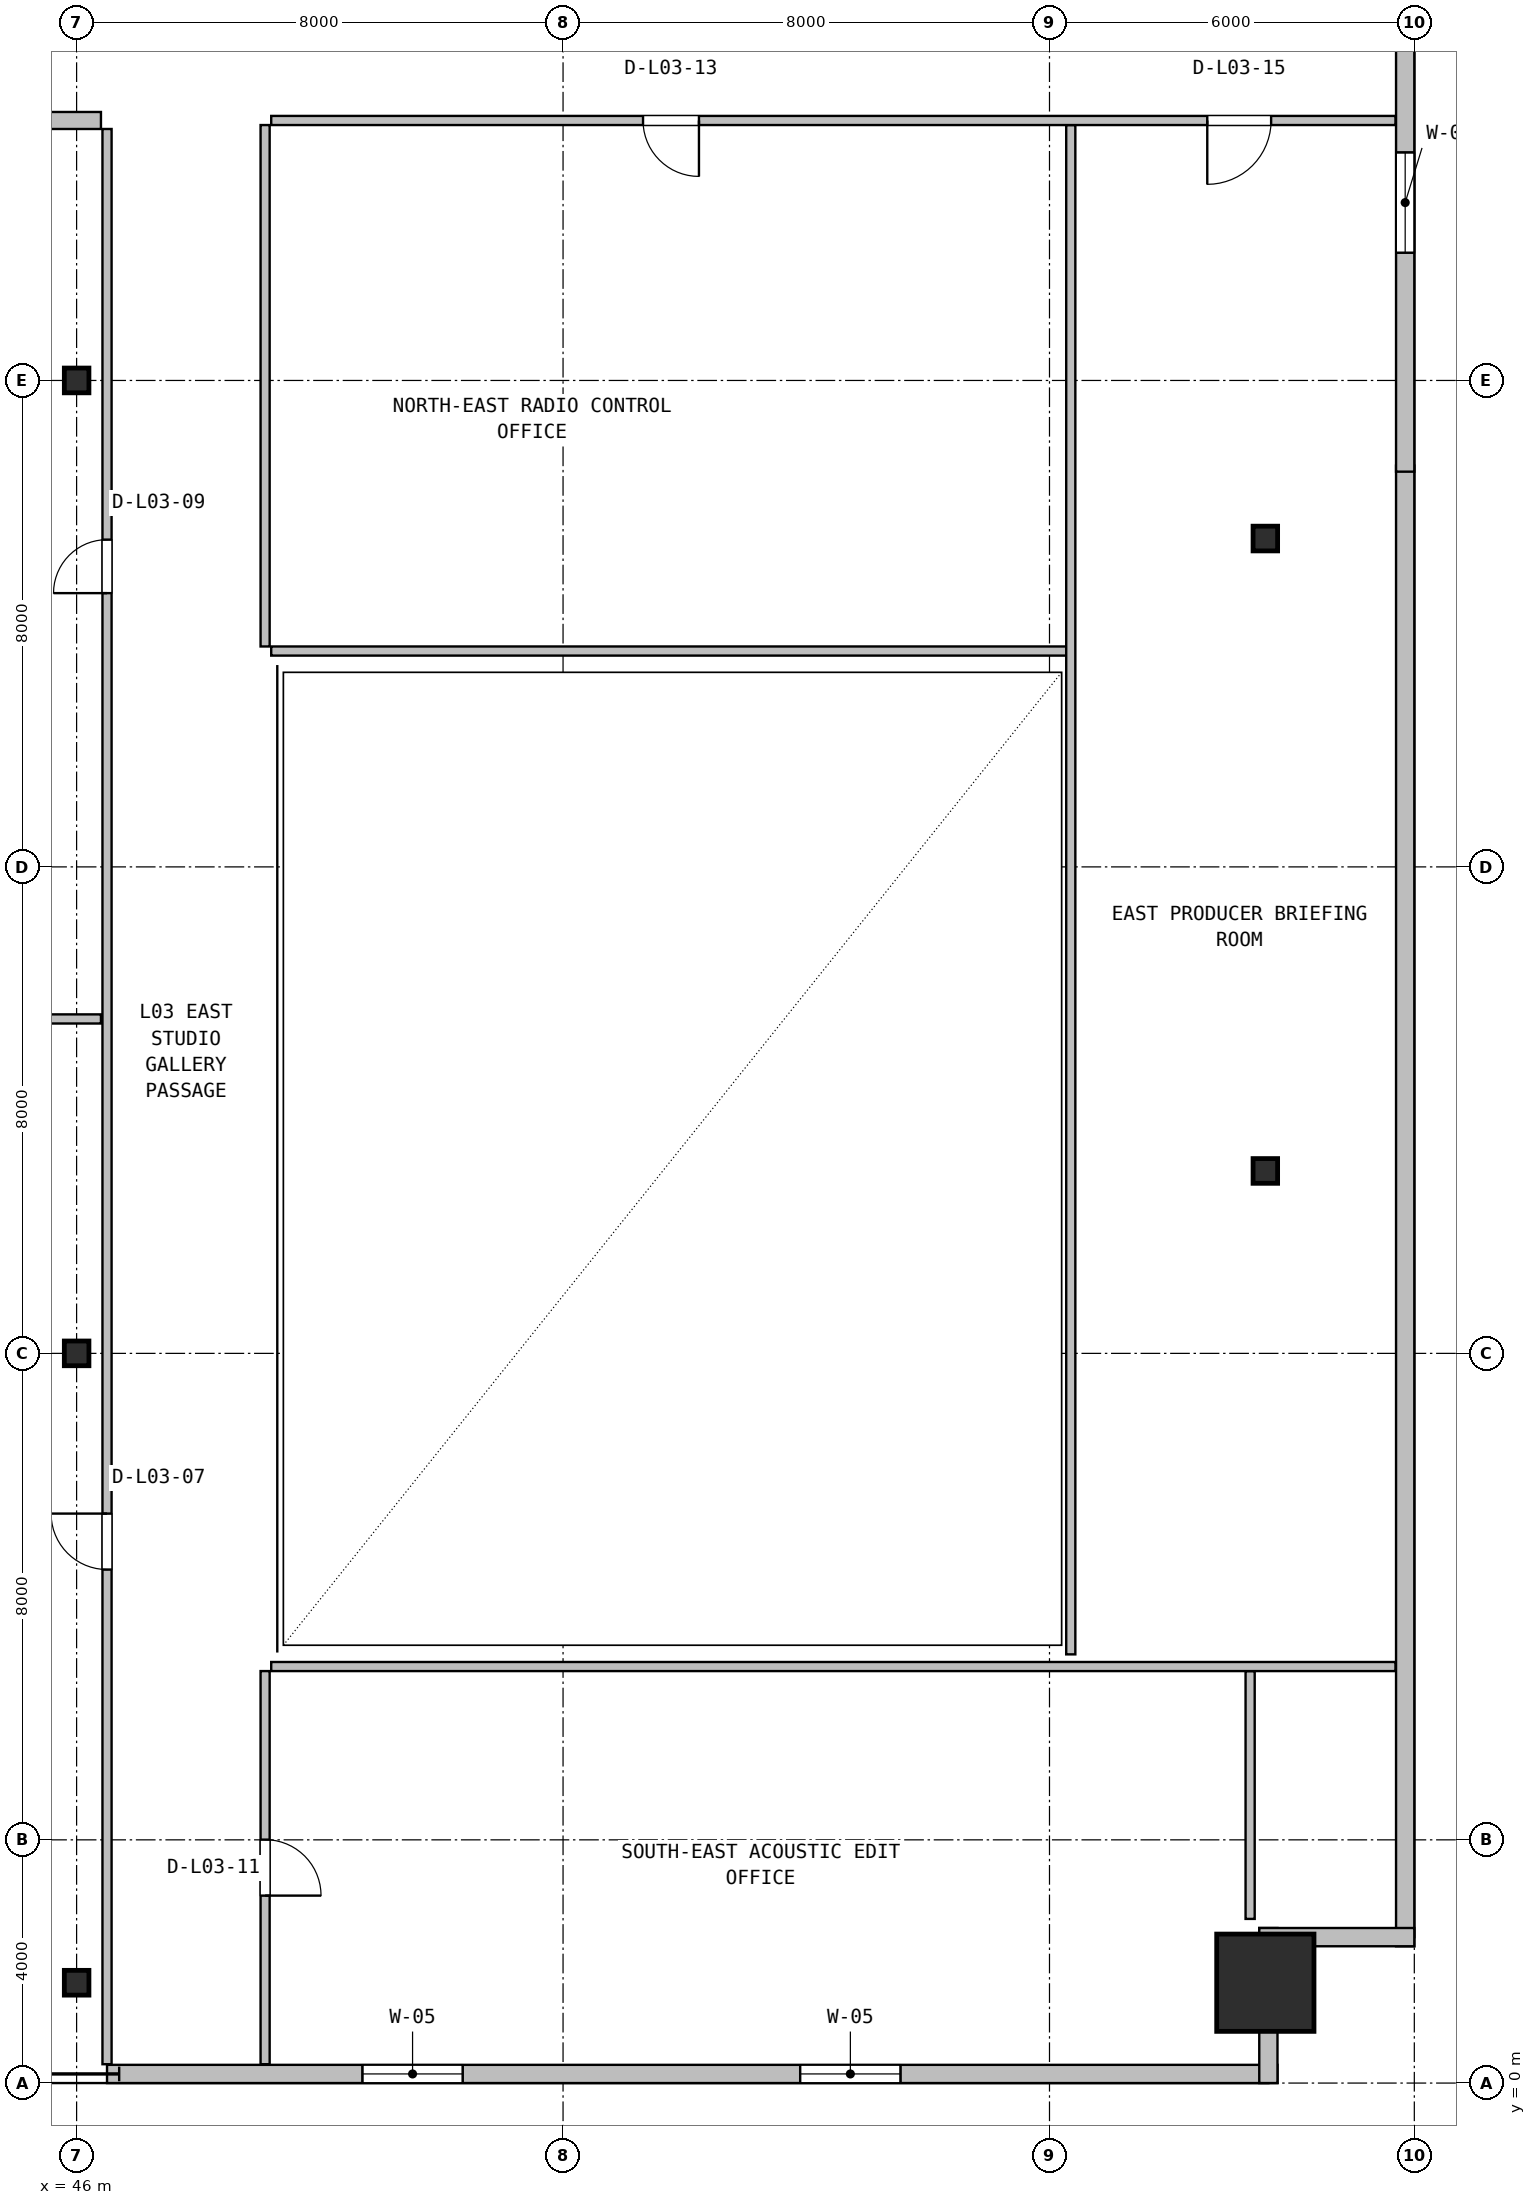
"""IFC4 building model, lengths in metres.
Left out: names, types, materials, properties, quantities, classifications, styles, units other than length and angle.
Written with IfcOpenShell. Run it as: python <this file> out.ifc"""

import sys

from ifc_helpers import new_model, si_unit, direction, frame, frame_2d, origin, origin_2d, place, context, subcontext, project, spatial, rectangle, hollow_rectangle, i_section, extrude, source, transform, mapped, element, fill, save


model = new_model("IFC4")
c1 = context("Model", 3, precision=1e-05, world=origin(), true_north=direction((0.0, 1.0)))
c2 = subcontext(c1, "Body", "Model", "MODEL_VIEW")
j1 = project(units=[si_unit("LENGTHUNIT", "METRE"), si_unit("PLANEANGLEUNIT", "RADIAN")], contexts=[c1])
p1 = place(None, origin())
s1 = spatial("IfcSite", under=j1, at=p1, CompositionType="ELEMENT")
p2 = place(p1, origin())
s2 = spatial("IfcBuilding", under=s1, at=p2, CompositionType="ELEMENT")
p3 = place(p2, frame((0.0, 0.0, 16.8)))
s3 = spatial("IfcBuildingStorey", under=s2, at=p3, CompositionType="ELEMENT", Elevation=16.8)
m1 = source(origin(), c2, "Body", "SweptSolid", [
    extrude(hollow_rectangle(XDim=1.6, YDim=1.6, WallThickness=0.06, at=origin_2d()), origin(), (0.0, 0.0, 1.0), 5.4),
])
p4 = place(p3, frame((65.55, 1.65, 0.0), z_axis=(0.0, 0.0, 1.0), x_axis=(1.0, 0.0, 0.0)))
e1 = element("IfcColumn", 1, at=p4, inside=s3, PredefinedType="COLUMN", context=c2, shape_type="MappedRepresentation", body=[
    mapped(m1, transform((0.0, 0.0, 0.0), x_axis=(1.0, 0.0, 0.0), y_axis=(0.0, 1.0, 0.0), z_axis=(0.0, 0.0, 1.0), scale=1.0)),
])
m2 = source(origin(), c2, "Body", "SweptSolid", [
    extrude(i_section(OverallWidth=0.404, OverallDepth=0.407, WebThickness=0.027, FlangeThickness=0.044, FilletRadius=0.018, at=origin_2d()), origin(), (0.0, 0.0, 1.0), 5.4),
])
for number, where, z_axis, x_axis in (
    (2, (46.0, 1.65, 0.0), (0.0, 0.0, 1.0), (1.0, 0.0, 0.0)),
    (3, (46.0, 12.0, 0.0), (0.0, 0.0, 1.0), (1.0, 0.0, 0.0)),
    (4, (46.0, 28.0, 0.0), (0.0, 0.0, 1.0), (1.0, 0.0, 0.0)),
    (5, (65.55, 15.0, 0.0), (0.0, 0.0, 1.0), (1.0, 0.0, 0.0)),
    (6, (65.55, 25.4, 0.0), (0.0, 0.0, 1.0), (1.0, 0.0, 0.0)),
):
    element("IfcColumn", number, at=place(p3, frame(where, z_axis=z_axis, x_axis=x_axis)), inside=s3, PredefinedType="COLUMN", context=c2, shape_type="MappedRepresentation", body=[
        mapped(m2, transform((0.0, 0.0, 0.0), x_axis=(1.0, 0.0, 0.0), y_axis=(0.0, 1.0, 0.0), z_axis=(0.0, 0.0, 1.0), scale=1.0)),
    ])
p5 = place(p3, frame((46.5, 0.15, 0.0), z_axis=(0.0, 0.0, 1.0), x_axis=(1.0, 0.0, 0.0)))
e7 = element("IfcWall", 7, at=p5, inside=s3, PredefinedType="SOLIDWALL", context=c2, shape_type="SweptSolid", body=[
    extrude(rectangle(XDim=19.25, YDim=0.3, at=frame_2d((9.625, 0.0))), origin(), (0.0, 0.0, 1.0), 5.06),
])
p6 = place(p5, frame((4.2, 0.0, 0.9)))
e8 = element("IfcOpeningElement", 8, at=p6, cuts=e7, PredefinedType="OPENING", context=c2, shape_type="SweptSolid", body=[
    extrude(rectangle(XDim=1.65, YDim=1.8, at=frame_2d((0.825, 0.9))), frame((0.0, 0.16, 0.0), z_axis=(0.0, -1.0, 0.0), x_axis=(1.0, 0.0, 0.0)), (0.0, 0.0, 1.0), 0.32),
])
p7 = place(p5, frame((11.4, 0.0, 0.9)))
e9 = element("IfcOpeningElement", 9, at=p7, cuts=e7, PredefinedType="OPENING", context=c2, shape_type="SweptSolid", body=[
    extrude(rectangle(XDim=1.65, YDim=1.8, at=frame_2d((0.825, 0.9))), frame((0.0, 0.16, 0.0), z_axis=(0.0, -1.0, 0.0), x_axis=(1.0, 0.0, 0.0)), (0.0, 0.0, 1.0), 0.32),
])
p8 = place(p3, frame((67.85, 2.25, 0.0), z_axis=(0.0, 0.0, 1.0), x_axis=(0.0, 1.0, 0.0)))
e10 = element("IfcWall", 10, at=p8, inside=s3, PredefinedType="SOLIDWALL", context=c2, shape_type="SweptSolid", body=[
    extrude(rectangle(XDim=24.35, YDim=0.3, at=frame_2d((12.175, 0.0))), origin(), (0.0, 0.0, 1.0), 5.06),
])
p9 = place(p3, frame((67.85, 26.5, 0.0), z_axis=(0.0, 0.0, 1.0), x_axis=(0.0, 1.0, 0.0)))
e11 = element("IfcWall", 11, at=p9, inside=s3, PredefinedType="SOLIDWALL", context=c2, shape_type="SweptSolid", body=[
    extrude(rectangle(XDim=19.25, YDim=0.3, at=frame_2d((9.625, 0.0))), origin(), (0.0, 0.0, 1.0), 5.06),
])
p10 = place(p9, frame((3.6, 0.0, 0.9)))
e12 = element("IfcOpeningElement", 12, at=p10, cuts=e11, PredefinedType="OPENING", context=c2, shape_type="SweptSolid", body=[
    extrude(rectangle(XDim=1.65, YDim=1.8, at=frame_2d((0.825, 0.9))), frame((0.0, 0.16, 0.0), z_axis=(0.0, -1.0, 0.0), x_axis=(1.0, 0.0, 0.0)), (0.0, 0.0, 1.0), 0.32),
])
p11 = place(p9, frame((12.8, 0.0, 0.9)))
e13 = element("IfcOpeningElement", 13, at=p11, cuts=e11, PredefinedType="OPENING", context=c2, shape_type="SweptSolid", body=[
    extrude(rectangle(XDim=1.65, YDim=1.8, at=frame_2d((0.825, 0.9))), frame((0.0, 0.16, 0.0), z_axis=(0.0, -1.0, 0.0), x_axis=(1.0, 0.0, 0.0)), (0.0, 0.0, 1.0), 0.32),
])
for number, where, z_axis, x_axis in (
    (14, (65.6, 0.0, 0.0), (0.0, 0.0, 1.0), (0.0, 1.0, 0.0)),
    (15, (65.45, 2.4, 0.0), (0.0, 0.0, 1.0), (1.0, 0.0, 0.0)),
):
    element("IfcWall", number, at=place(p3, frame(where, z_axis=z_axis, x_axis=x_axis)), inside=s3, PredefinedType="SOLIDWALL", context=c2, shape_type="SweptSolid", body=[
        extrude(rectangle(XDim=2.55, YDim=0.3, at=frame_2d((1.275, 0.0))), origin(), (0.0, 0.0, 1.0), 4.143),
    ])
p12 = place(p3, frame((21.6, 17.5, 0.0), z_axis=(0.0, 0.0, 1.0), x_axis=(1.0, 0.0, 0.0)))
e16 = element("IfcWall", 16, at=p12, inside=s3, PredefinedType="PARTITIONING", context=c2, shape_type="SweptSolid", body=[
    extrude(rectangle(XDim=24.8, YDim=0.15, at=frame_2d((12.4, 0.0))), origin(), (0.0, 0.0, 1.0), 4.143),
])
p13 = place(p3, frame((46.5, 0.31, 0.0), z_axis=(0.0, 0.0, 1.0), x_axis=(0.0, 1.0, 0.0)))
e17 = element("IfcWall", 17, at=p13, inside=s3, PredefinedType="PARTITIONING", context=c2, shape_type="SweptSolid", body=[
    extrude(rectangle(XDim=31.825, YDim=0.15, at=frame_2d((15.913, 0.0))), origin(), (0.0, 0.0, 1.0), 4.143),
])
p14 = place(p13, frame((8.135, 0.0, 0.0)))
e18 = element("IfcOpeningElement", 18, at=p14, cuts=e17, PredefinedType="OPENING", context=c2, shape_type="SweptSolid", body=[
    extrude(rectangle(XDim=0.92, YDim=2.08, at=frame_2d((0.46, 1.04))), frame((0.0, 0.085, 0.0), z_axis=(0.0, -1.0, 0.0), x_axis=(1.0, 0.0, 0.0)), (0.0, 0.0, 1.0), 0.17),
])
p15 = place(p13, frame((24.192, 0.0, 0.0)))
e19 = element("IfcOpeningElement", 19, at=p15, cuts=e17, PredefinedType="OPENING", context=c2, shape_type="SweptSolid", body=[
    extrude(rectangle(XDim=0.88, YDim=2.06, at=frame_2d((0.44, 1.03))), frame((0.0, 0.085, 0.0), z_axis=(0.0, -1.0, 0.0), x_axis=(1.0, 0.0, 0.0)), (0.0, 0.0, 1.0), 0.17),
])
p16 = place(p3, frame((21.6, 32.275, 0.0), z_axis=(0.0, 0.0, 1.0), x_axis=(1.0, 0.0, 0.0)))
e20 = element("IfcWall", 20, at=p16, inside=s3, PredefinedType="SOLIDWALL", context=c2, shape_type="SweptSolid", body=[
    extrude(rectangle(XDim=24.8, YDim=0.28, at=frame_2d((12.4, 0.0))), origin(), (0.0, 0.0, 1.0), 4.143),
])
p17 = place(p16, frame((6.3, 0.0, 0.0)))
e21 = element("IfcOpeningElement", 21, at=p17, cuts=e20, PredefinedType="OPENING", context=c2, shape_type="SweptSolid", body=[
    extrude(rectangle(XDim=1.8, YDim=2.25, at=frame_2d((0.9, 1.125))), frame((0.0, 0.15, 0.0), z_axis=(0.0, -1.0, 0.0), x_axis=(1.0, 0.0, 0.0)), (0.0, 0.0, 1.0), 0.3),
])
p18 = place(p16, frame((8.85, 0.0, 0.95)))
e22 = element("IfcOpeningElement", 22, at=p18, cuts=e20, PredefinedType="OPENING", context=c2, shape_type="SweptSolid", body=[
    extrude(rectangle(XDim=2.2, YDim=1.3, at=frame_2d((1.1, 0.65))), frame((0.0, 0.15, 0.0), z_axis=(0.0, -1.0, 0.0), x_axis=(1.0, 0.0, 0.0)), (0.0, 0.0, 1.0), 0.3),
])
p19 = place(p3, frame((65.3, 2.7, 0.0), z_axis=(0.0, 0.0, 1.0), x_axis=(0.0, 1.0, 0.0)))
e23 = element("IfcWall", 23, at=p19, inside=s3, PredefinedType="PARTITIONING", context=c2, shape_type="SweptSolid", body=[
    extrude(rectangle(XDim=4.075, YDim=0.15, at=frame_2d((2.038, 0.0))), origin(), (0.0, 0.0, 1.0), 4.143),
])
p20 = place(p3, frame((49.2, 6.85, 0.0), z_axis=(0.0, 0.0, 1.0), x_axis=(1.0, 0.0, 0.0)))
e24 = element("IfcWall", 24, at=p20, inside=s3, PredefinedType="PARTITIONING", context=c2, shape_type="SweptSolid", body=[
    extrude(rectangle(XDim=18.49, YDim=0.15, at=frame_2d((9.245, 0.0))), origin(), (0.0, 0.0, 1.0), 4.143),
])
p21 = place(p3, frame((49.1, 0.31, 0.0), z_axis=(0.0, 0.0, 1.0), x_axis=(0.0, 1.0, 0.0)))
e25 = element("IfcWall", 25, at=p21, inside=s3, PredefinedType="PARTITIONING", context=c2, shape_type="SweptSolid", body=[
    extrude(rectangle(XDim=6.465, YDim=0.15, at=frame_2d((3.232, 0.0))), origin(), (0.0, 0.0, 1.0), 4.143),
])
p22 = place(p21, frame((2.773, 0.0, 0.0)))
e26 = element("IfcOpeningElement", 26, at=p22, cuts=e25, PredefinedType="OPENING", context=c2, shape_type="SweptSolid", body=[
    extrude(rectangle(XDim=0.92, YDim=2.08, at=frame_2d((0.46, 1.04))), frame((0.0, 0.085, 0.0), z_axis=(0.0, -1.0, 0.0), x_axis=(1.0, 0.0, 0.0)), (0.0, 0.0, 1.0), 0.17),
])
p23 = place(p3, frame((49.2, 23.55, 0.0), z_axis=(0.0, 0.0, 1.0), x_axis=(1.0, 0.0, 0.0)))
e27 = element("IfcWall", 27, at=p23, inside=s3, PredefinedType="PARTITIONING", context=c2, shape_type="SweptSolid", body=[
    extrude(rectangle(XDim=13.15, YDim=0.15, at=frame_2d((6.575, 0.0))), origin(), (0.0, 0.0, 1.0), 5.06),
])
p24 = place(p3, frame((62.35, 7.05, 0.0), z_axis=(0.0, 0.0, 1.0), x_axis=(0.0, 1.0, 0.0)))
e28 = element("IfcWall", 28, at=p24, inside=s3, PredefinedType="PARTITIONING", context=c2, shape_type="SweptSolid", body=[
    extrude(rectangle(XDim=25.15, YDim=0.15, at=frame_2d((12.575, 0.0))), origin(), (0.0, 0.0, 1.0), 4.143),
])
p25 = place(p3, frame((49.2, 32.275, 0.0), z_axis=(0.0, 0.0, 1.0), x_axis=(1.0, 0.0, 0.0)))
e29 = element("IfcWall", 29, at=p25, inside=s3, PredefinedType="PARTITIONING", context=c2, shape_type="SweptSolid", body=[
    extrude(rectangle(XDim=18.49, YDim=0.15, at=frame_2d((9.245, 0.0))), origin(), (0.0, 0.0, 1.0), 4.143),
])
p26 = place(p25, frame((6.115, 0.0, 0.0)))
e30 = element("IfcOpeningElement", 30, at=p26, cuts=e29, PredefinedType="OPENING", context=c2, shape_type="SweptSolid", body=[
    extrude(rectangle(XDim=0.92, YDim=2.08, at=frame_2d((0.46, 1.04))), frame((0.0, 0.085, 0.0), z_axis=(0.0, -1.0, 0.0), x_axis=(1.0, 0.0, 0.0)), (0.0, 0.0, 1.0), 0.17),
])
p27 = place(p25, frame((15.395, 0.0, 0.0)))
e31 = element("IfcOpeningElement", 31, at=p27, cuts=e29, PredefinedType="OPENING", context=c2, shape_type="SweptSolid", body=[
    extrude(rectangle(XDim=1.05, YDim=2.1, at=frame_2d((0.525, 1.05))), frame((0.0, 0.085, 0.0), z_axis=(0.0, -1.0, 0.0), x_axis=(1.0, 0.0, 0.0)), (0.0, 0.0, 1.0), 0.17),
])
p28 = place(p3, frame((49.1, 23.625, 0.0), z_axis=(0.0, 0.0, 1.0), x_axis=(0.0, 1.0, 0.0)))
e32 = element("IfcWall", 32, at=p28, inside=s3, PredefinedType="PARTITIONING", context=c2, shape_type="SweptSolid", body=[
    extrude(rectangle(XDim=8.575, YDim=0.15, at=frame_2d((4.288, 0.0))), origin(), (0.0, 0.0, 1.0), 4.143),
])
m3 = source(origin(), c2, "Body", "SweptSolid", [
    extrude(rectangle(XDim=1.65, YDim=1.8, at=frame_2d((0.825, 0.9))), frame((0.0, 0.03, 0.0), z_axis=(0.0, -1.0, 0.0), x_axis=(1.0, 0.0, 0.0)), (0.0, 0.0, 1.0), 0.06),
])
p29 = place(p6, origin())
e33 = element("IfcWindow", 33, at=p29, inside=s3, PartitioningType="SINGLE_PANEL", PredefinedType="WINDOW", context=c2, shape_type="MappedRepresentation", body=[
    mapped(m3, transform((0.0, 0.0, 0.0), x_axis=(1.0, 0.0, 0.0), y_axis=(0.0, 1.0, 0.0), z_axis=(0.0, 0.0, 1.0), scale=1.0)),
])
fill(e8, e33)
p30 = place(p7, origin())
e34 = element("IfcWindow", 34, at=p30, inside=s3, PartitioningType="SINGLE_PANEL", PredefinedType="WINDOW", context=c2, shape_type="MappedRepresentation", body=[
    mapped(m3, transform((0.0, 0.0, 0.0), x_axis=(1.0, 0.0, 0.0), y_axis=(0.0, 1.0, 0.0), z_axis=(0.0, 0.0, 1.0), scale=1.0)),
])
fill(e9, e34)
p31 = place(p10, origin())
e35 = element("IfcWindow", 35, at=p31, inside=s3, PartitioningType="SINGLE_PANEL", PredefinedType="WINDOW", context=c2, shape_type="MappedRepresentation", body=[
    mapped(m3, transform((0.0, 0.0, 0.0), x_axis=(1.0, 0.0, 0.0), y_axis=(0.0, 1.0, 0.0), z_axis=(0.0, 0.0, 1.0), scale=1.0)),
])
fill(e12, e35)
m4 = source(origin(), c2, "Body", "SweptSolid", [
    extrude(rectangle(XDim=0.92, YDim=2.08, at=frame_2d((0.46, 1.04))), frame((0.0, 0.025, 0.0), z_axis=(0.0, -1.0, 0.0), x_axis=(1.0, 0.0, 0.0)), (0.0, 0.0, 1.0), 0.05),
])
p32 = place(p14, origin())
e36 = element("IfcDoor", 36, at=p32, inside=s3, OperationType="SINGLE_SWING_RIGHT", PredefinedType="DOOR", context=c2, shape_type="MappedRepresentation", body=[
    mapped(m4, transform((0.0, 0.0, 0.0), x_axis=(1.0, 0.0, 0.0), y_axis=(0.0, 1.0, 0.0), z_axis=(0.0, 0.0, 1.0), scale=1.0)),
])
fill(e18, e36)
m5 = source(origin(), c2, "Body", "SweptSolid", [
    extrude(rectangle(XDim=0.88, YDim=2.06, at=frame_2d((0.44, 1.03))), frame((0.0, 0.025, 0.0), z_axis=(0.0, -1.0, 0.0), x_axis=(1.0, 0.0, 0.0)), (0.0, 0.0, 1.0), 0.05),
])
p33 = place(p15, origin())
e37 = element("IfcDoor", 37, at=p33, inside=s3, OperationType="SINGLE_SWING_LEFT", PredefinedType="DOOR", context=c2, shape_type="MappedRepresentation", body=[
    mapped(m5, transform((0.0, 0.0, 0.0), x_axis=(1.0, 0.0, 0.0), y_axis=(0.0, 1.0, 0.0), z_axis=(0.0, 0.0, 1.0), scale=1.0)),
])
fill(e19, e37)
p34 = place(p22, frame((0.92, 0.0, 0.0), z_axis=(0.0, 0.0, 1.0), x_axis=(-1.0, 0.0, 0.0)))
e38 = element("IfcDoor", 38, at=p34, inside=s3, OperationType="SINGLE_SWING_LEFT", PredefinedType="DOOR", context=c2, shape_type="MappedRepresentation", body=[
    mapped(m4, transform((0.0, 0.0, 0.0), x_axis=(1.0, 0.0, 0.0), y_axis=(0.0, 1.0, 0.0), z_axis=(0.0, 0.0, 1.0), scale=1.0)),
])
fill(e26, e38)
p35 = place(p26, frame((0.92, 0.0, 0.0), z_axis=(0.0, 0.0, 1.0), x_axis=(-1.0, 0.0, 0.0)))
e39 = element("IfcDoor", 39, at=p35, inside=s3, OperationType="SINGLE_SWING_RIGHT", PredefinedType="DOOR", context=c2, shape_type="MappedRepresentation", body=[
    mapped(m4, transform((0.0, 0.0, 0.0), x_axis=(1.0, 0.0, 0.0), y_axis=(0.0, 1.0, 0.0), z_axis=(0.0, 0.0, 1.0), scale=1.0)),
])
fill(e30, e39)
m6 = source(origin(), c2, "Body", "SweptSolid", [
    extrude(rectangle(XDim=1.05, YDim=2.1, at=frame_2d((0.525, 1.05))), frame((0.0, 0.025, 0.0), z_axis=(0.0, -1.0, 0.0), x_axis=(1.0, 0.0, 0.0)), (0.0, 0.0, 1.0), 0.05),
])
p36 = place(p27, frame((1.05, 0.0, 0.0), z_axis=(0.0, 0.0, 1.0), x_axis=(-1.0, 0.0, 0.0)))
e40 = element("IfcDoor", 40, at=p36, inside=s3, OperationType="SINGLE_SWING_LEFT", PredefinedType="DOOR", context=c2, shape_type="MappedRepresentation", body=[
    mapped(m6, transform((0.0, 0.0, 0.0), x_axis=(1.0, 0.0, 0.0), y_axis=(0.0, 1.0, 0.0), z_axis=(0.0, 0.0, 1.0), scale=1.0)),
])
fill(e31, e40)
save(model, sys.argv[1])
